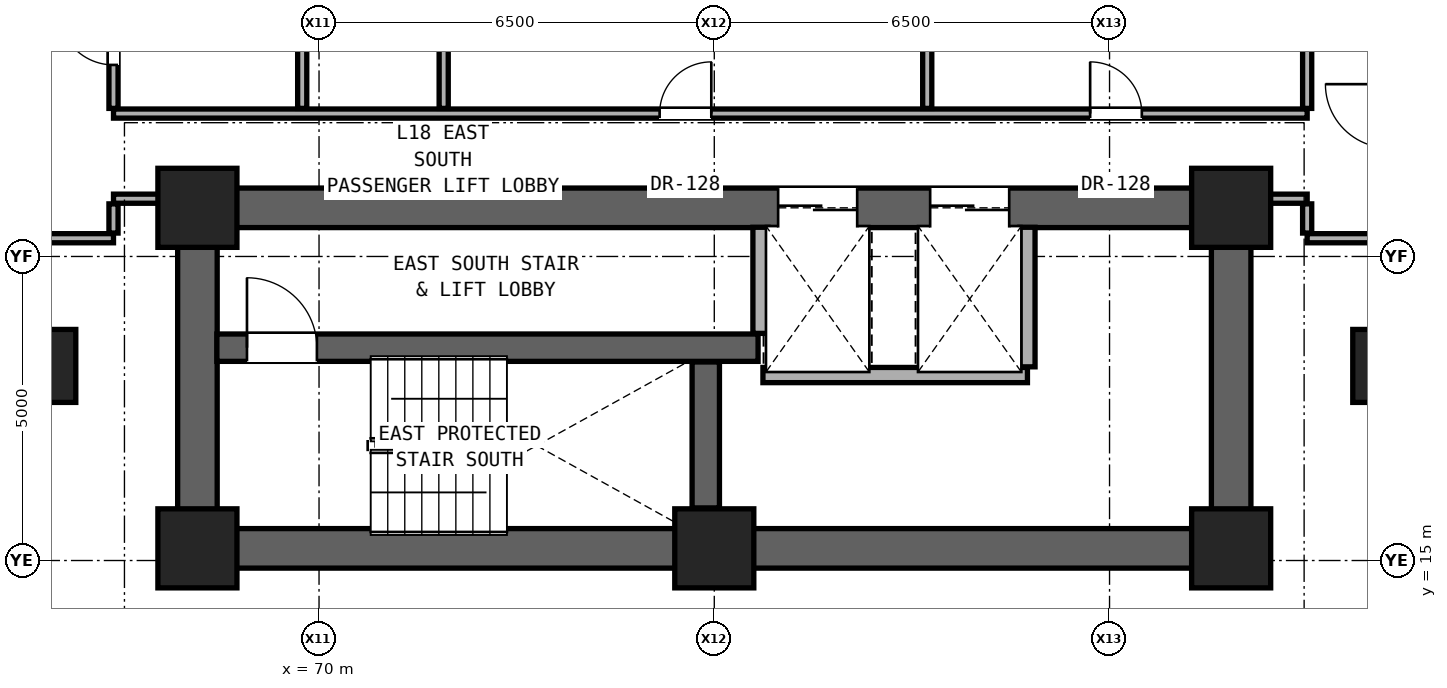
"""IFC4 building model, lengths in metres.
Left out: names, types, materials, properties, quantities, classifications, styles, units other than length and angle.
Written with IfcOpenShell. Run it as: python <this file> out.ifc"""

import sys

from ifc_helpers import new_model, si_unit, direction, frame, frame_2d, origin, origin_2d, place, context, subcontext, project, spatial, rectangle, extrude, element, fill, save


model = new_model("IFC4")
c1 = context("Model", 3, precision=1e-05, world=origin(), true_north=direction((0.0, 1.0)))
c2 = subcontext(c1, "Body", "Model", "MODEL_VIEW")
j1 = project(units=[si_unit("LENGTHUNIT", "METRE"), si_unit("PLANEANGLEUNIT", "RADIAN")], contexts=[c1])
p1 = place(None, origin())
s1 = spatial("IfcSite", under=j1, at=p1, CompositionType="ELEMENT")
p2 = place(p1, origin())
s2 = spatial("IfcBuilding", under=s1, at=p2, CompositionType="ELEMENT")
p3 = place(p2, frame((0.0, 0.0, 65.3)))
s3 = spatial("IfcBuildingStorey", under=s2, at=p3, CompositionType="ELEMENT", Elevation=65.3)
for number, where, z_axis, x_axis in (
    (1, (68.0, 15.2, 0.0), (0.0, 0.0, 1.0), (1.0, 0.0, 0.0)),
    (2, (76.5, 15.2, 0.0), (0.0, 0.0, 1.0), (1.0, 0.0, 0.0)),
    (3, (85.0, 15.2, 0.0), (0.0, 0.0, 1.0), (1.0, 0.0, 0.0)),
    (4, (68.0, 20.8, 0.0), (0.0, 0.0, 1.0), (1.0, 0.0, 0.0)),
    (5, (85.0, 20.8, 0.0), (0.0, 0.0, 1.0), (1.0, 0.0, 0.0)),
):
    element("IfcColumn", number, at=place(p3, frame(where, z_axis=z_axis, x_axis=x_axis)), inside=s3, PredefinedType="COLUMN", context=c2, shape_type="SweptSolid", body=[
        extrude(rectangle(XDim=1.3, YDim=1.3, at=origin_2d()), origin(), (0.0, 0.0, 1.0), 3.3),
    ])
for number, where, z_axis, x_axis in (
    (6, (65.6, 18.2, 0.0), (0.0, 0.0, 1.0), (1.0, 0.0, 0.0)),
    (7, (87.4, 18.2, 0.0), (0.0, 0.0, 1.0), (1.0, 0.0, 0.0)),
):
    element("IfcColumn", number, at=place(p3, frame(where, z_axis=z_axis, x_axis=x_axis)), inside=s3, PredefinedType="PILASTER", context=c2, shape_type="SweptSolid", body=[
        extrude(rectangle(XDim=0.8, YDim=1.2, at=origin_2d()), origin(), (0.0, 0.0, 1.0), 3.3),
    ])
p4 = place(p3, frame((68.0, 15.2, 0.0), z_axis=(0.0, 0.0, 1.0), x_axis=(1.0, 0.0, 0.0)))
e8 = element("IfcWall", 8, at=p4, inside=s3, PredefinedType="SHEAR", context=c2, shape_type="SweptSolid", body=[
    extrude(rectangle(XDim=17.0, YDim=0.65, at=frame_2d((8.5, 0.0))), origin(), (0.0, 0.0, 1.0), 3.06),
])
for number, where, z_axis, x_axis in (
    (9, (68.0, 15.2, 0.0), (0.0, 0.0, 1.0), (0.0, 1.0, 0.0)),
    (10, (85.0, 15.2, 0.0), (0.0, 0.0, 1.0), (0.0, 1.0, 0.0)),
):
    element("IfcWall", number, at=place(p3, frame(where, z_axis=z_axis, x_axis=x_axis)), inside=s3, PredefinedType="SHEAR", context=c2, shape_type="SweptSolid", body=[
        extrude(rectangle(XDim=5.6, YDim=0.65, at=frame_2d((2.8, 0.0))), origin(), (0.0, 0.0, 1.0), 3.06),
    ])
p5 = place(p3, frame((68.0, 20.8, 0.0), z_axis=(0.0, 0.0, 1.0), x_axis=(1.0, 0.0, 0.0)))
e11 = element("IfcWall", 11, at=p5, inside=s3, PredefinedType="SHEAR", context=c2, shape_type="SweptSolid", body=[
    extrude(rectangle(XDim=17.0, YDim=0.65, at=frame_2d((8.5, 0.0))), origin(), (0.0, 0.0, 1.0), 3.06),
])
p6 = place(p5, frame((9.55, 0.0, 0.0)))
e12 = element("IfcOpeningElement", 12, at=p6, cuts=e11, PredefinedType="OPENING", context=c2, shape_type="SweptSolid", body=[
    extrude(rectangle(XDim=1.3, YDim=2.3, at=frame_2d((0.65, 1.15))), frame((0.0, 0.335, 0.0), z_axis=(0.0, -1.0, 0.0), x_axis=(1.0, 0.0, 0.0)), (0.0, 0.0, 1.0), 0.67),
])
p7 = place(p5, frame((12.05, 0.0, 0.0)))
e13 = element("IfcOpeningElement", 13, at=p7, cuts=e11, PredefinedType="OPENING", context=c2, shape_type="SweptSolid", body=[
    extrude(rectangle(XDim=1.3, YDim=2.3, at=frame_2d((0.65, 1.15))), frame((0.0, 0.335, 0.0), z_axis=(0.0, -1.0, 0.0), x_axis=(1.0, 0.0, 0.0)), (0.0, 0.0, 1.0), 0.67),
])
p8 = place(p3, frame((77.3, 18.05, 0.0), z_axis=(0.0, 0.0, 1.0), x_axis=(1.0, 0.0, 0.0)))
e14 = element("IfcWall", 14, at=p8, inside=s3, PredefinedType="SOLIDWALL", context=c2, shape_type="SweptSolid", body=[
    extrude(rectangle(XDim=4.35, YDim=0.25, at=frame_2d((2.175, 0.0))), origin(), (0.0, 0.0, 1.0), 3.06),
])
p9 = place(p3, frame((68.32, 18.5, 0.0), z_axis=(0.0, 0.0, 1.0), x_axis=(1.0, 0.0, 0.0)))
e15 = element("IfcWall", 15, at=p9, inside=s3, PredefinedType="SHEAR", context=c2, shape_type="SweptSolid", body=[
    extrude(rectangle(XDim=8.9, YDim=0.45, at=frame_2d((4.45, 0.0))), origin(), (0.0, 0.0, 1.0), 3.06),
])
p10 = place(p9, frame((0.495, 0.0, 0.0)))
e16 = element("IfcOpeningElement", 16, at=p10, cuts=e15, PredefinedType="OPENING", context=c2, shape_type="SweptSolid", body=[
    extrude(rectangle(XDim=1.15, YDim=2.2, at=frame_2d((0.575, 1.1))), frame((0.0, 0.235, 0.0), z_axis=(0.0, -1.0, 0.0), x_axis=(1.0, 0.0, 0.0)), (0.0, 0.0, 1.0), 0.47),
])
p11 = place(p3, frame((65.25, 20.3, 0.0), z_axis=(0.0, 0.0, 1.0), x_axis=(1.0, 0.0, 0.0)))
e17 = element("IfcWall", 17, at=p11, inside=s3, PredefinedType="PARTITIONING", context=c2, shape_type="SweptSolid", body=[
    extrude(rectangle(XDim=1.37, YDim=0.15, at=frame_2d((0.685, 0.0))), origin(), (0.0, 0.0, 1.0), 3.06),
])
p12 = place(p3, frame((86.25, 20.3, 0.0), z_axis=(0.0, 0.0, 1.0), x_axis=(1.0, 0.0, 0.0)))
e18 = element("IfcWall", 18, at=p12, inside=s3, PredefinedType="PARTITIONING", context=c2, shape_type="SweptSolid", body=[
    extrude(rectangle(XDim=1.35, YDim=0.15, at=frame_2d((0.675, 0.0))), origin(), (0.0, 0.0, 1.0), 3.06),
])
p13 = place(p3, frame((66.62, 20.95, 0.0), z_axis=(0.0, 0.0, 1.0), x_axis=(1.0, 0.0, 0.0)))
e19 = element("IfcWall", 19, at=p13, inside=s3, PredefinedType="PARTITIONING", context=c2, shape_type="SweptSolid", body=[
    extrude(rectangle(XDim=1.06, YDim=0.15, at=frame_2d((0.53, 0.0))), origin(), (0.0, 0.0, 1.0), 2.452),
])
p14 = place(p3, frame((85.32, 20.95, 0.0), z_axis=(0.0, 0.0, 1.0), x_axis=(1.0, 0.0, 0.0)))
e20 = element("IfcWall", 20, at=p14, inside=s3, PredefinedType="PARTITIONING", context=c2, shape_type="SweptSolid", body=[
    extrude(rectangle(XDim=0.93, YDim=0.15, at=frame_2d((0.465, 0.0))), origin(), (0.0, 0.0, 1.0), 2.452),
])
p15 = place(p3, frame((66.62, 22.35, 0.0), z_axis=(0.0, 0.0, 1.0), x_axis=(1.0, 0.0, 0.0)))
e21 = element("IfcWall", 21, at=p15, inside=s3, PredefinedType="PARTITIONING", context=c2, shape_type="SweptSolid", body=[
    extrude(rectangle(XDim=19.63, YDim=0.15, at=frame_2d((9.815, 0.0))), origin(), (0.0, 0.0, 1.0), 2.125),
])
p16 = place(p15, frame((8.981, 0.0, 0.0)))
e22 = element("IfcOpeningElement", 22, at=p16, cuts=e21, PredefinedType="OPENING", context=c2, shape_type="SweptSolid", body=[
    extrude(rectangle(XDim=0.85, YDim=2.01, at=frame_2d((0.425, 1.005))), frame((0.0, 0.085, 0.0), z_axis=(0.0, -1.0, 0.0), x_axis=(1.0, 0.0, 0.0)), (0.0, 0.0, 1.0), 0.17),
])
p17 = place(p15, frame((16.061, 0.0, 0.0)))
e23 = element("IfcOpeningElement", 23, at=p17, cuts=e21, PredefinedType="OPENING", context=c2, shape_type="SweptSolid", body=[
    extrude(rectangle(XDim=0.85, YDim=2.01, at=frame_2d((0.425, 1.005))), frame((0.0, 0.085, 0.0), z_axis=(0.0, -1.0, 0.0), x_axis=(1.0, 0.0, 0.0)), (0.0, 0.0, 1.0), 0.17),
])
p18 = place(p3, frame((66.62, 20.385, 0.0), z_axis=(0.0, 0.0, 1.0), x_axis=(0.0, 1.0, 0.0)))
e24 = element("IfcWall", 24, at=p18, inside=s3, PredefinedType="PARTITIONING", context=c2, shape_type="SweptSolid", body=[
    extrude(rectangle(XDim=0.48, YDim=0.15, at=frame_2d((0.24, 0.0))), origin(), (0.0, 0.0, 1.0), 2.452),
])
p19 = place(p3, frame((66.62, 22.435, 0.0), z_axis=(0.0, 0.0, 1.0), x_axis=(0.0, 1.0, 0.0)))
e25 = element("IfcWall", 25, at=p19, inside=s3, PredefinedType="PARTITIONING", context=c2, shape_type="SweptSolid", body=[
    extrude(rectangle(XDim=2.33, YDim=0.15, at=frame_2d((1.165, 0.0))), origin(), (0.0, 0.0, 1.0), 3.06),
])
p20 = place(p19, frame((0.715, 0.0, 0.0)))
e26 = element("IfcOpeningElement", 26, at=p20, cuts=e25, PredefinedType="OPENING", context=c2, shape_type="SweptSolid", body=[
    extrude(rectangle(XDim=0.9, YDim=2.1, at=frame_2d((0.45, 1.05))), frame((0.0, 0.085, 0.0), z_axis=(0.0, -1.0, 0.0), x_axis=(1.0, 0.0, 0.0)), (0.0, 0.0, 1.0), 0.17),
])
p21 = place(p3, frame((69.723, 22.435, 0.0), z_axis=(0.0, 0.0, 1.0), x_axis=(0.0, 1.0, 0.0)))
e27 = element("IfcWall", 27, at=p21, inside=s3, PredefinedType="PARTITIONING", context=c2, shape_type="SweptSolid", body=[
    extrude(rectangle(XDim=2.33, YDim=0.15, at=frame_2d((1.165, 0.0))), origin(), (0.0, 0.0, 1.0), 3.06),
])
p22 = place(p3, frame((72.05, 22.435, 0.0), z_axis=(0.0, 0.0, 1.0), x_axis=(0.0, 1.0, 0.0)))
e28 = element("IfcWall", 28, at=p22, inside=s3, PredefinedType="PARTITIONING", context=c2, shape_type="SweptSolid", body=[
    extrude(rectangle(XDim=3.565, YDim=0.15, at=frame_2d((1.782, 0.0))), origin(), (0.0, 0.0, 1.0), 2.589),
])
p23 = place(p3, frame((76.36, 15.865, 0.0), z_axis=(0.0, 0.0, 1.0), x_axis=(0.0, 1.0, 0.0)))
e29 = element("IfcWall", 29, at=p23, inside=s3, PredefinedType="SHEAR", context=c2, shape_type="SweptSolid", body=[
    extrude(rectangle(XDim=2.4, YDim=0.45, at=frame_2d((1.2, 0.0))), origin(), (0.0, 0.0, 1.0), 3.06),
])
p24 = place(p3, frame((77.26, 18.735, 0.0), z_axis=(0.0, 0.0, 1.0), x_axis=(0.0, 1.0, 0.0)))
e30 = element("IfcWall", 30, at=p24, inside=s3, PredefinedType="SOLIDWALL", context=c2, shape_type="SweptSolid", body=[
    extrude(rectangle(XDim=1.745, YDim=0.25, at=frame_2d((0.873, 0.0))), origin(), (0.0, 0.0, 1.0), 3.06),
])
p25 = place(p3, frame((80.002, 22.435, 0.0), z_axis=(0.0, 0.0, 1.0), x_axis=(0.0, 1.0, 0.0)))
e31 = element("IfcWall", 31, at=p25, inside=s3, PredefinedType="PARTITIONING", context=c2, shape_type="SweptSolid", body=[
    extrude(rectangle(XDim=3.565, YDim=0.15, at=frame_2d((1.782, 0.0))), origin(), (0.0, 0.0, 1.0), 3.06),
])
p26 = place(p3, frame((81.65, 18.185, 0.0), z_axis=(0.0, 0.0, 1.0), x_axis=(0.0, 1.0, 0.0)))
e32 = element("IfcWall", 32, at=p26, inside=s3, PredefinedType="SOLIDWALL", context=c2, shape_type="SweptSolid", body=[
    extrude(rectangle(XDim=2.295, YDim=0.25, at=frame_2d((1.147, 0.0))), origin(), (0.0, 0.0, 1.0), 3.06),
])
p27 = place(p3, frame((86.25, 20.385, 0.0), z_axis=(0.0, 0.0, 1.0), x_axis=(0.0, 1.0, 0.0)))
e33 = element("IfcWall", 33, at=p27, inside=s3, PredefinedType="PARTITIONING", context=c2, shape_type="SweptSolid", body=[
    extrude(rectangle(XDim=0.48, YDim=0.15, at=frame_2d((0.24, 0.0))), origin(), (0.0, 0.0, 1.0), 2.452),
])
p28 = place(p3, frame((86.25, 22.435, 0.0), z_axis=(0.0, 0.0, 1.0), x_axis=(0.0, 1.0, 0.0)))
e34 = element("IfcWall", 34, at=p28, inside=s3, PredefinedType="PARTITIONING", context=c2, shape_type="SweptSolid", body=[
    extrude(rectangle(XDim=3.565, YDim=0.15, at=frame_2d((1.782, 0.0))), origin(), (0.0, 0.0, 1.0), 3.06),
])
p29 = place(p10, origin())
e35 = element("IfcDoor", 35, at=p29, inside=s3, OperationType="SINGLE_SWING_LEFT", PredefinedType="DOOR", context=c2, shape_type="SweptSolid", body=[
    extrude(rectangle(XDim=1.15, YDim=2.2, at=frame_2d((0.575, 1.1))), frame((0.0, 0.025, 0.0), z_axis=(0.0, -1.0, 0.0), x_axis=(1.0, 0.0, 0.0)), (0.0, 0.0, 1.0), 0.05),
])
fill(e16, e35)
p30 = place(p20, origin())
e36 = element("IfcDoor", 36, at=p30, inside=s3, OperationType="SINGLE_SWING_RIGHT", PredefinedType="DOOR", context=c2, shape_type="SweptSolid", body=[
    extrude(rectangle(XDim=0.9, YDim=2.1, at=frame_2d((0.45, 1.05))), frame((0.0, 0.025, 0.0), z_axis=(0.0, -1.0, 0.0), x_axis=(1.0, 0.0, 0.0)), (0.0, 0.0, 1.0), 0.05),
])
fill(e26, e36)
p31 = place(p16, origin())
e37 = element("IfcDoor", 37, at=p31, inside=s3, OperationType="SINGLE_SWING_RIGHT", PredefinedType="DOOR", context=c2, shape_type="SweptSolid", body=[
    extrude(rectangle(XDim=0.85, YDim=2.01, at=frame_2d((0.425, 1.005))), frame((0.0, 0.025, 0.0), z_axis=(0.0, -1.0, 0.0), x_axis=(1.0, 0.0, 0.0)), (0.0, 0.0, 1.0), 0.05),
])
fill(e22, e37)
p32 = place(p17, origin())
e38 = element("IfcDoor", 38, at=p32, inside=s3, OperationType="SINGLE_SWING_LEFT", PredefinedType="DOOR", context=c2, shape_type="SweptSolid", body=[
    extrude(rectangle(XDim=0.85, YDim=2.01, at=frame_2d((0.425, 1.005))), frame((0.0, 0.025, 0.0), z_axis=(0.0, -1.0, 0.0), x_axis=(1.0, 0.0, 0.0)), (0.0, 0.0, 1.0), 0.05),
])
fill(e23, e38)
p33 = place(p6, origin())
e39 = element("IfcDoor", 39, at=p33, inside=s3, OperationType="DOUBLE_DOOR_SLIDING", PredefinedType="DOOR", context=c2, shape_type="SweptSolid", body=[
    extrude(rectangle(XDim=1.3, YDim=2.3, at=frame_2d((0.65, 1.15))), frame((0.0, 0.025, 0.0), z_axis=(0.0, -1.0, 0.0), x_axis=(1.0, 0.0, 0.0)), (0.0, 0.0, 1.0), 0.05),
])
fill(e12, e39)
p34 = place(p7, origin())
e40 = element("IfcDoor", 40, at=p34, inside=s3, OperationType="DOUBLE_DOOR_SLIDING", PredefinedType="DOOR", context=c2, shape_type="SweptSolid", body=[
    extrude(rectangle(XDim=1.3, YDim=2.3, at=frame_2d((0.65, 1.15))), frame((0.0, 0.025, 0.0), z_axis=(0.0, -1.0, 0.0), x_axis=(1.0, 0.0, 0.0)), (0.0, 0.0, 1.0), 0.05),
])
fill(e13, e40)
save(model, sys.argv[1])
